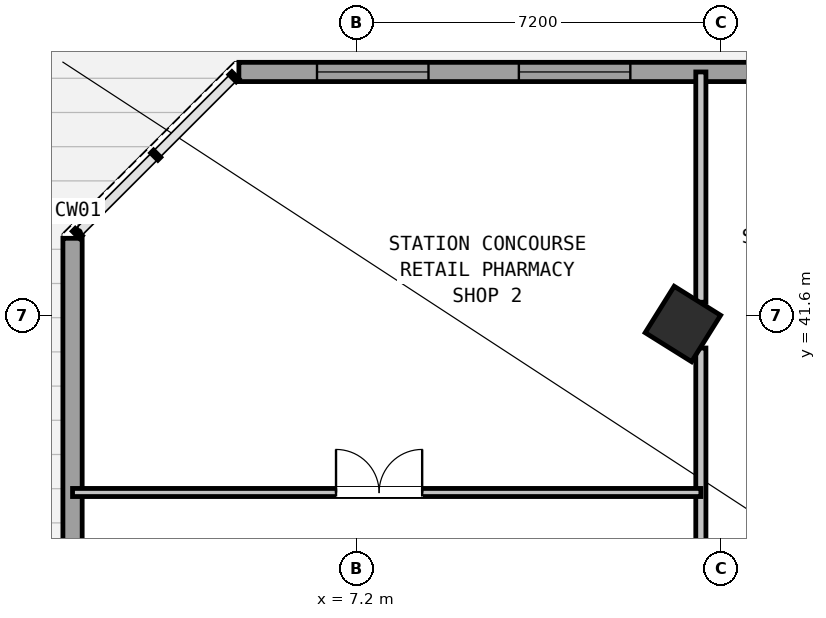
"""IFC4 building model, lengths in metres.
Left out: names, types, materials, properties, quantities, classifications, styles, units other than length and angle.
Written with IfcOpenShell. Run it as: python <this file> out.ifc"""

import sys

from ifc_helpers import new_model, si_unit, direction, frame, frame_2d, origin, origin_2d, place, context, subcontext, project, spatial, rectangle, hollow_rectangle, extrude, source, transform, mapped, element, fill, save


model = new_model("IFC4")
c1 = context("Model", 3, precision=1e-05, world=origin(), true_north=direction((0.0, 1.0)))
c2 = subcontext(c1, "Body", "Model", "MODEL_VIEW")
j1 = project(units=[si_unit("LENGTHUNIT", "METRE"), si_unit("PLANEANGLEUNIT", "RADIAN")], contexts=[c1])
p1 = place(None, origin())
s1 = spatial("IfcSite", under=j1, at=p1, CompositionType="ELEMENT")
p2 = place(p1, origin())
s2 = spatial("IfcBuilding", under=s1, at=p2, CompositionType="ELEMENT")
p3 = place(p2, origin())
s3 = spatial("IfcBuildingStorey", under=s2, at=p3, CompositionType="ELEMENT", Elevation=0.0)
m1 = source(origin(), c2, "Body", "SweptSolid", [
    extrude(hollow_rectangle(XDim=1.08, YDim=1.08, WallThickness=0.04, at=origin_2d()), origin(), (0.0, 0.0, 1.0), 5.4),
])
p4 = place(p3, frame((13.646, 41.426, 0.0), z_axis=(0.0, 0.0, 1.0), x_axis=(-0.848048096156, 0.529919264233, 0.0)))
e1 = element("IfcColumn", 1, at=p4, inside=s3, PredefinedType="COLUMN", context=c2, shape_type="MappedRepresentation", body=[
    mapped(m1, transform((0.0, 0.0, 0.0), scale=1.0)),
])
p5 = place(p3, frame((1.6, 4.883, 0.0), z_axis=(0.0, 0.0, 1.0), x_axis=(0.0, 1.0, 0.0)))
e2 = element("IfcWall", 2, at=p5, inside=s3, PredefinedType="STANDARD", context=c2, shape_type="SweptSolid", body=[
    extrude(rectangle(XDim=38.234, YDim=0.38, at=frame_2d((19.117, 0.0))), origin(), (0.0, 0.0, 1.0), 5.05),
])
p6 = place(p5, frame((16.617, 0.0, 0.0)))
e3 = element("IfcOpeningElement", 3, at=p6, cuts=e2, PredefinedType="OPENING", context=c2, shape_type="SweptSolid", body=[
    extrude(rectangle(XDim=2.2, YDim=2.6, at=frame_2d((1.1, 1.3))), frame((0.0, 0.2, 0.0), z_axis=(0.0, -1.0, 0.0), x_axis=(1.0, 0.0, 0.0)), (0.0, 0.0, 1.0), 0.4),
])
p7 = place(p5, frame((28.317, 0.0, 0.0)))
e4 = element("IfcOpeningElement", 4, at=p7, cuts=e2, PredefinedType="OPENING", context=c2, shape_type="SweptSolid", body=[
    extrude(rectangle(XDim=1.6, YDim=2.4, at=frame_2d((0.8, 1.2))), frame((0.0, 0.2, 0.0), z_axis=(0.0, -1.0, 0.0), x_axis=(1.0, 0.0, 0.0)), (0.0, 0.0, 1.0), 0.4),
])
p8 = place(p3, frame((4.883, 46.4, 0.0), z_axis=(0.0, 0.0, 1.0), x_axis=(1.0, 0.0, 0.0)))
e5 = element("IfcWall", 5, at=p8, inside=s3, PredefinedType="STANDARD", context=c2, shape_type="SweptSolid", body=[
    extrude(rectangle(XDim=62.234, YDim=0.38, at=frame_2d((31.117, 0.0))), origin(), (0.0, 0.0, 1.0), 5.05),
])
p9 = place(p8, frame((1.542, 0.0, 0.85)))
e6 = element("IfcOpeningElement", 6, at=p9, cuts=e5, PredefinedType="OPENING", context=c2, shape_type="SweptSolid", body=[
    extrude(rectangle(XDim=2.2, YDim=1.75, at=frame_2d((1.1, 0.875))), frame((0.0, 0.2, 0.0), z_axis=(0.0, -1.0, 0.0), x_axis=(1.0, 0.0, 0.0)), (0.0, 0.0, 1.0), 0.4),
])
p10 = place(p8, frame((5.525, 0.0, 0.85)))
e7 = element("IfcOpeningElement", 7, at=p10, cuts=e5, PredefinedType="OPENING", context=c2, shape_type="SweptSolid", body=[
    extrude(rectangle(XDim=2.2, YDim=1.75, at=frame_2d((1.1, 0.875))), frame((0.0, 0.2, 0.0), z_axis=(0.0, -1.0, 0.0), x_axis=(1.0, 0.0, 0.0)), (0.0, 0.0, 1.0), 0.4),
])
p11 = place(p8, frame((10.175, 0.0, 1.0)))
e8 = element("IfcOpeningElement", 8, at=p11, cuts=e5, PredefinedType="OPENING", context=c2, shape_type="SweptSolid", body=[
    extrude(rectangle(XDim=1.1, YDim=1.35, at=frame_2d((0.55, 0.675))), frame((0.0, 0.2, 0.0), z_axis=(0.0, -1.0, 0.0), x_axis=(1.0, 0.0, 0.0)), (0.0, 0.0, 1.0), 0.4),
])
p12 = place(p8, frame((12.39, 0.0, 1.0)))
e9 = element("IfcOpeningElement", 9, at=p12, cuts=e5, PredefinedType="OPENING", context=c2, shape_type="SweptSolid", body=[
    extrude(rectangle(XDim=1.1, YDim=1.35, at=frame_2d((0.55, 0.675))), frame((0.0, 0.2, 0.0), z_axis=(0.0, -1.0, 0.0), x_axis=(1.0, 0.0, 0.0)), (0.0, 0.0, 1.0), 0.4),
])
p13 = place(p8, frame((15.57, 0.0, 0.95)))
e10 = element("IfcOpeningElement", 10, at=p13, cuts=e5, PredefinedType="OPENING", context=c2, shape_type="SweptSolid", body=[
    extrude(rectangle(XDim=1.4, YDim=1.5, at=frame_2d((0.7, 0.75))), frame((0.0, 0.2, 0.0), z_axis=(0.0, -1.0, 0.0), x_axis=(1.0, 0.0, 0.0)), (0.0, 0.0, 1.0), 0.4),
])
p14 = place(p8, frame((18.135, 0.0, 0.95)))
e11 = element("IfcOpeningElement", 11, at=p14, cuts=e5, PredefinedType="OPENING", context=c2, shape_type="SweptSolid", body=[
    extrude(rectangle(XDim=1.4, YDim=1.5, at=frame_2d((0.7, 0.75))), frame((0.0, 0.2, 0.0), z_axis=(0.0, -1.0, 0.0), x_axis=(1.0, 0.0, 0.0)), (0.0, 0.0, 1.0), 0.4),
])
p15 = place(p8, frame((21.857, 0.0, 0.85)))
e12 = element("IfcOpeningElement", 12, at=p15, cuts=e5, PredefinedType="OPENING", context=c2, shape_type="SweptSolid", body=[
    extrude(rectangle(XDim=2.2, YDim=1.75, at=frame_2d((1.1, 0.875))), frame((0.0, 0.2, 0.0), z_axis=(0.0, -1.0, 0.0), x_axis=(1.0, 0.0, 0.0)), (0.0, 0.0, 1.0), 0.4),
])
p16 = place(p8, frame((25.535, 0.0, 0.85)))
e13 = element("IfcOpeningElement", 13, at=p16, cuts=e5, PredefinedType="OPENING", context=c2, shape_type="SweptSolid", body=[
    extrude(rectangle(XDim=2.2, YDim=1.75, at=frame_2d((1.1, 0.875))), frame((0.0, 0.2, 0.0), z_axis=(0.0, -1.0, 0.0), x_axis=(1.0, 0.0, 0.0)), (0.0, 0.0, 1.0), 0.4),
])
p17 = place(p8, frame((29.214, 0.0, 0.85)))
e14 = element("IfcOpeningElement", 14, at=p17, cuts=e5, PredefinedType="OPENING", context=c2, shape_type="SweptSolid", body=[
    extrude(rectangle(XDim=2.2, YDim=1.75, at=frame_2d((1.1, 0.875))), frame((0.0, 0.2, 0.0), z_axis=(0.0, -1.0, 0.0), x_axis=(1.0, 0.0, 0.0)), (0.0, 0.0, 1.0), 0.4),
])
p18 = place(p8, frame((32.893, 0.0, 0.85)))
e15 = element("IfcOpeningElement", 15, at=p18, cuts=e5, PredefinedType="OPENING", context=c2, shape_type="SweptSolid", body=[
    extrude(rectangle(XDim=2.2, YDim=1.75, at=frame_2d((1.1, 0.875))), frame((0.0, 0.2, 0.0), z_axis=(0.0, -1.0, 0.0), x_axis=(1.0, 0.0, 0.0)), (0.0, 0.0, 1.0), 0.4),
])
p19 = place(p8, frame((36.572, 0.0, 0.85)))
e16 = element("IfcOpeningElement", 16, at=p19, cuts=e5, PredefinedType="OPENING", context=c2, shape_type="SweptSolid", body=[
    extrude(rectangle(XDim=2.2, YDim=1.75, at=frame_2d((1.1, 0.875))), frame((0.0, 0.2, 0.0), z_axis=(0.0, -1.0, 0.0), x_axis=(1.0, 0.0, 0.0)), (0.0, 0.0, 1.0), 0.4),
])
p20 = place(p8, frame((40.251, 0.0, 0.85)))
e17 = element("IfcOpeningElement", 17, at=p20, cuts=e5, PredefinedType="OPENING", context=c2, shape_type="SweptSolid", body=[
    extrude(rectangle(XDim=2.2, YDim=1.75, at=frame_2d((1.1, 0.875))), frame((0.0, 0.2, 0.0), z_axis=(0.0, -1.0, 0.0), x_axis=(1.0, 0.0, 0.0)), (0.0, 0.0, 1.0), 0.4),
])
p21 = place(p8, frame((43.93, 0.0, 0.85)))
e18 = element("IfcOpeningElement", 18, at=p21, cuts=e5, PredefinedType="OPENING", context=c2, shape_type="SweptSolid", body=[
    extrude(rectangle(XDim=2.2, YDim=1.75, at=frame_2d((1.1, 0.875))), frame((0.0, 0.2, 0.0), z_axis=(0.0, -1.0, 0.0), x_axis=(1.0, 0.0, 0.0)), (0.0, 0.0, 1.0), 0.4),
])
p22 = place(p8, frame((47.608, 0.0, 0.85)))
e19 = element("IfcOpeningElement", 19, at=p22, cuts=e5, PredefinedType="OPENING", context=c2, shape_type="SweptSolid", body=[
    extrude(rectangle(XDim=2.2, YDim=1.75, at=frame_2d((1.1, 0.875))), frame((0.0, 0.2, 0.0), z_axis=(0.0, -1.0, 0.0), x_axis=(1.0, 0.0, 0.0)), (0.0, 0.0, 1.0), 0.4),
])
p23 = place(p8, frame((51.287, 0.0, 0.85)))
e20 = element("IfcOpeningElement", 20, at=p23, cuts=e5, PredefinedType="OPENING", context=c2, shape_type="SweptSolid", body=[
    extrude(rectangle(XDim=2.2, YDim=1.75, at=frame_2d((1.1, 0.875))), frame((0.0, 0.2, 0.0), z_axis=(0.0, -1.0, 0.0), x_axis=(1.0, 0.0, 0.0)), (0.0, 0.0, 1.0), 0.4),
])
p24 = place(p8, frame((54.966, 0.0, 0.85)))
e21 = element("IfcOpeningElement", 21, at=p24, cuts=e5, PredefinedType="OPENING", context=c2, shape_type="SweptSolid", body=[
    extrude(rectangle(XDim=2.2, YDim=1.75, at=frame_2d((1.1, 0.875))), frame((0.0, 0.2, 0.0), z_axis=(0.0, -1.0, 0.0), x_axis=(1.0, 0.0, 0.0)), (0.0, 0.0, 1.0), 0.4),
])
p25 = place(p8, frame((58.645, 0.0, 0.85)))
e22 = element("IfcOpeningElement", 22, at=p25, cuts=e5, PredefinedType="OPENING", context=c2, shape_type="SweptSolid", body=[
    extrude(rectangle(XDim=2.2, YDim=1.75, at=frame_2d((1.1, 0.875))), frame((0.0, 0.2, 0.0), z_axis=(0.0, -1.0, 0.0), x_axis=(1.0, 0.0, 0.0)), (0.0, 0.0, 1.0), 0.4),
])
p26 = place(p3, frame((14.0, 28.1, 0.0), z_axis=(0.0, 0.0, 1.0), x_axis=(0.0, 1.0, 0.0)))
e23 = element("IfcWall", 23, at=p26, inside=s3, PredefinedType="STANDARD", context=c2, shape_type="SweptSolid", body=[
    extrude(rectangle(XDim=12.852, YDim=0.2, at=frame_2d((6.426, 0.0))), origin(), (0.0, 0.0, 1.0), 5.04),
])
p27 = place(p3, frame((14.0, 41.855, 0.0), z_axis=(0.0, 0.0, 1.0), x_axis=(0.0, 1.0, 0.0)))
e24 = element("IfcWall", 24, at=p27, inside=s3, PredefinedType="STANDARD", context=c2, shape_type="SweptSolid", body=[
    extrude(rectangle(XDim=4.545, YDim=0.2, at=frame_2d((2.272, 0.0))), origin(), (0.0, 0.0, 1.0), 5.04),
])
p28 = place(p3, frame((1.6, 38.1, 0.0), z_axis=(0.0, 0.0, 1.0), x_axis=(1.0, 0.0, 0.0)))
e25 = element("IfcWall", 25, at=p28, inside=s3, PredefinedType="PARTITIONING", context=c2, shape_type="SweptSolid", body=[
    extrude(rectangle(XDim=12.4, YDim=0.16, at=frame_2d((6.2, 0.0))), origin(), (0.0, 0.0, 1.0), 5.04),
])
p29 = place(p28, frame((5.2, 0.0, 0.0)))
e26 = element("IfcOpeningElement", 26, at=p29, cuts=e25, PredefinedType="OPENING", context=c2, shape_type="SweptSolid", body=[
    extrude(rectangle(XDim=1.7, YDim=2.2, at=frame_2d((0.85, 1.1))), frame((0.0, 0.09, 0.0), z_axis=(0.0, -1.0, 0.0), x_axis=(1.0, 0.0, 0.0)), (0.0, 0.0, 1.0), 0.18),
])
m2 = source(origin(), c2, "Body", "SweptSolid", [
    extrude(rectangle(XDim=2.2, YDim=1.75, at=frame_2d((1.1, 0.875))), frame((0.0, 0.03, 0.0), z_axis=(0.0, -1.0, 0.0), x_axis=(1.0, 0.0, 0.0)), (0.0, 0.0, 1.0), 0.06),
])
p30 = place(p9, origin())
e27 = element("IfcWindow", 27, at=p30, inside=s3, PartitioningType="SINGLE_PANEL", PredefinedType="WINDOW", context=c2, shape_type="MappedRepresentation", body=[
    mapped(m2, transform((0.0, 0.0, 0.0), scale=1.0)),
])
fill(e6, e27)
p31 = place(p10, origin())
e28 = element("IfcWindow", 28, at=p31, inside=s3, PartitioningType="SINGLE_PANEL", PredefinedType="WINDOW", context=c2, shape_type="MappedRepresentation", body=[
    mapped(m2, transform((0.0, 0.0, 0.0), scale=1.0)),
])
fill(e7, e28)
m3 = source(origin(), c2, "Body", "SweptSolid", [
    extrude(rectangle(XDim=1.7, YDim=2.2, at=frame_2d((0.85, 1.1))), frame((0.0, 0.025, 0.0), z_axis=(0.0, -1.0, 0.0), x_axis=(1.0, 0.0, 0.0)), (0.0, 0.0, 1.0), 0.05),
])
p32 = place(p29, origin())
e29 = element("IfcDoor", 29, at=p32, inside=s3, OperationType="DOUBLE_DOOR_SINGLE_SWING", PredefinedType="DOOR", context=c2, shape_type="MappedRepresentation", body=[
    mapped(m3, transform((0.0, 0.0, 0.0), scale=1.0)),
])
fill(e26, e29)
save(model, sys.argv[1])
